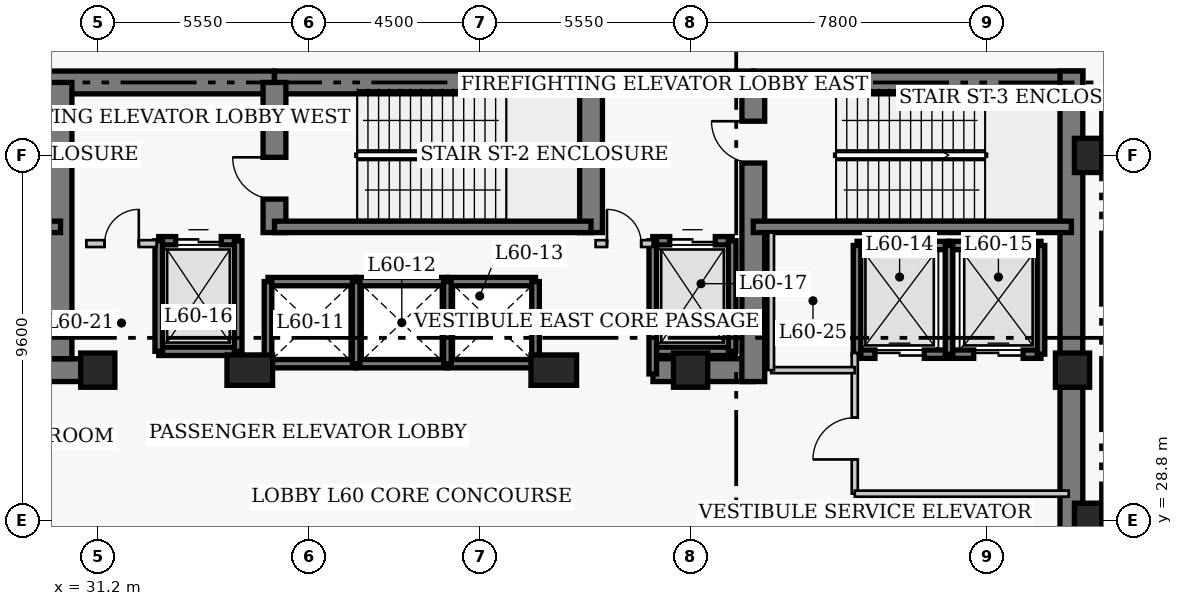
"""IFC4 building model, lengths in metres.
Left out: names, types, materials, properties, quantities, classifications, styles, units other than length and angle.
Written with IfcOpenShell. Run it as: python <this file> out.ifc"""

import sys

from ifc_helpers import new_model, si_unit, direction, frame, frame_2d, origin, origin_2d, place, context, subcontext, project, spatial, rectangle, extrude, element, fill, save


model = new_model("IFC4")
c1 = context("Model", 3, precision=1e-05, world=origin(), true_north=direction((0.0, 1.0)))
c2 = subcontext(c1, "Body", "Model", "MODEL_VIEW")
j1 = project(units=[si_unit("LENGTHUNIT", "METRE"), si_unit("PLANEANGLEUNIT", "RADIAN")], contexts=[c1])
p1 = place(None, origin())
s1 = spatial("IfcSite", under=j1, at=p1, CompositionType="ELEMENT")
p2 = place(p1, origin())
s2 = spatial("IfcBuilding", under=s1, at=p2, CompositionType="ELEMENT")
p3 = place(p2, frame((0.0, 0.0, 240.4)))
s3 = spatial("IfcBuildingStorey", under=s2, at=p3, CompositionType="ELEMENT", Elevation=240.4)
p4 = place(p3, frame((21.6, 40.32, 0.0), z_axis=(0.0, 0.0, 1.0), x_axis=(1.0, 0.0, 0.0)))
e1 = element("IfcWall", 1, at=p4, inside=s3, PredefinedType="SHEAR", context=c2, shape_type="SweptSolid", body=[
    extrude(rectangle(XDim=14.25, YDim=0.6, at=frame_2d((7.125, 0.0))), origin(), (0.0, 0.0, 1.0), 5.0),
])
p5 = place(p3, frame((35.85, 40.32, 0.0), z_axis=(0.0, 0.0, 1.0), x_axis=(1.0, 0.0, 0.0)))
e2 = element("IfcWall", 2, at=p5, inside=s3, PredefinedType="SHEAR", context=c2, shape_type="SweptSolid", body=[
    extrude(rectangle(XDim=12.6, YDim=0.6, at=frame_2d((6.3, 0.0))), origin(), (0.0, 0.0, 1.0), 5.0),
])
p6 = place(p3, frame((48.45, 40.32, 0.0), z_axis=(0.0, 0.0, 1.0), x_axis=(1.0, 0.0, 0.0)))
e3 = element("IfcWall", 3, at=p6, inside=s3, PredefinedType="SHEAR", context=c2, shape_type="SweptSolid", body=[
    extrude(rectangle(XDim=8.67, YDim=0.6, at=frame_2d((4.335, 0.0))), origin(), (0.0, 0.0, 1.0), 5.0),
])
p7 = place(p3, frame((56.82, 27.05, 0.0), z_axis=(0.0, 0.0, 1.0), x_axis=(0.0, 1.0, 0.0)))
e4 = element("IfcWall", 4, at=p7, inside=s3, PredefinedType="SHEAR", context=c2, shape_type="SweptSolid", body=[
    extrude(rectangle(XDim=13.57, YDim=0.6, at=frame_2d((6.785, 0.0))), origin(), (0.0, 0.0, 1.0), 5.0),
])
p8 = place(p3, frame((28.45, 32.75, 0.0), z_axis=(0.0, 0.0, 1.0), x_axis=(1.0, 0.0, 0.0)))
e5 = element("IfcWall", 5, at=p8, inside=s3, PredefinedType="SHEAR", context=c2, shape_type="SweptSolid", body=[
    extrude(rectangle(XDim=2.4, YDim=0.6, at=frame_2d((1.2, 0.0))), origin(), (0.0, 0.0, 1.0), 5.0),
])
p9 = place(p3, frame((45.81, 32.75, 0.0), z_axis=(0.0, 0.0, 1.0), x_axis=(1.0, 0.0, 0.0)))
e6 = element("IfcWall", 6, at=p9, inside=s3, PredefinedType="SHEAR", context=c2, shape_type="SweptSolid", body=[
    extrude(rectangle(XDim=2.64, YDim=0.6, at=frame_2d((1.32, 0.0))), origin(), (0.0, 0.0, 1.0), 5.0),
])
p10 = place(p3, frame((30.22, 33.05, 0.0), z_axis=(0.0, 0.0, 1.0), x_axis=(0.0, 1.0, 0.0)))
e7 = element("IfcWall", 7, at=p10, inside=s3, PredefinedType="SHEAR", context=c2, shape_type="SweptSolid", body=[
    extrude(rectangle(XDim=7.27, YDim=0.6, at=frame_2d((3.635, 0.0))), origin(), (0.0, 0.0, 1.0), 5.0),
])
p11 = place(p3, frame((35.85, 36.37, 0.0), z_axis=(0.0, 0.0, 1.0), x_axis=(0.0, 1.0, 0.0)))
e8 = element("IfcWall", 8, at=p11, inside=s3, PredefinedType="SHEAR", context=c2, shape_type="SweptSolid", body=[
    extrude(rectangle(XDim=3.95, YDim=0.6, at=frame_2d((1.975, 0.0))), origin(), (0.0, 0.0, 1.0), 5.0),
])
p12 = place(p11, frame((0.88, 0.0, 0.0)))
e9 = element("IfcOpeningElement", 9, at=p12, cuts=e8, PredefinedType="OPENING", context=c2, shape_type="SweptSolid", body=[
    extrude(rectangle(XDim=1.1, YDim=2.15, at=frame_2d((0.55, 1.075))), frame((0.0, 0.31, 0.0), z_axis=(0.0, -1.0, 0.0), x_axis=(1.0, 0.0, 0.0)), (0.0, 0.0, 1.0), 0.62),
])
p13 = place(p3, frame((44.18, 36.37, 0.0), z_axis=(0.0, 0.0, 1.0), x_axis=(0.0, 1.0, 0.0)))
e10 = element("IfcWall", 10, at=p13, inside=s3, PredefinedType="SHEAR", context=c2, shape_type="SweptSolid", body=[
    extrude(rectangle(XDim=3.95, YDim=0.6, at=frame_2d((1.975, 0.0))), origin(), (0.0, 0.0, 1.0), 5.0),
])
p14 = place(p3, frame((48.45, 32.45, 0.0), z_axis=(0.0, 0.0, 1.0), x_axis=(0.0, 1.0, 0.0)))
e11 = element("IfcWall", 11, at=p14, inside=s3, PredefinedType="SHEAR", context=c2, shape_type="SweptSolid", body=[
    extrude(rectangle(XDim=7.87, YDim=0.6, at=frame_2d((3.935, 0.0))), origin(), (0.0, 0.0, 1.0), 5.0),
])
p15 = place(p14, frame((5.75, 0.0, 0.0)))
e12 = element("IfcOpeningElement", 12, at=p15, cuts=e11, PredefinedType="OPENING", context=c2, shape_type="SweptSolid", body=[
    extrude(rectangle(XDim=1.1, YDim=2.15, at=frame_2d((0.55, 1.075))), frame((0.0, 0.31, 0.0), z_axis=(0.0, -1.0, 0.0), x_axis=(1.0, 0.0, 0.0)), (0.0, 0.0, 1.0), 0.62),
])
p16 = place(p3, frame((21.9, 36.52, 0.0), z_axis=(0.0, 0.0, 1.0), x_axis=(1.0, 0.0, 0.0)))
e13 = element("IfcWall", 13, at=p16, inside=s3, PredefinedType="SHEAR", context=c2, shape_type="SweptSolid", body=[
    extrude(rectangle(XDim=8.32, YDim=0.3, at=frame_2d((4.16, 0.0))), origin(), (0.0, 0.0, 1.0), 5.0),
])
p17 = place(p16, frame((0.9, 0.0, 0.0)))
e14 = element("IfcOpeningElement", 14, at=p17, cuts=e13, PredefinedType="OPENING", context=c2, shape_type="SweptSolid", body=[
    extrude(rectangle(XDim=1.1, YDim=2.15, at=frame_2d((0.55, 1.075))), frame((0.0, 0.16, 0.0), z_axis=(0.0, -1.0, 0.0), x_axis=(1.0, 0.0, 0.0)), (0.0, 0.0, 1.0), 0.32),
])
p18 = place(p3, frame((35.85, 36.52, 0.0), z_axis=(0.0, 0.0, 1.0), x_axis=(1.0, 0.0, 0.0)))
e15 = element("IfcWall", 15, at=p18, inside=s3, PredefinedType="SHEAR", context=c2, shape_type="SweptSolid", body=[
    extrude(rectangle(XDim=8.33, YDim=0.3, at=frame_2d((4.165, 0.0))), origin(), (0.0, 0.0, 1.0), 5.0),
])
p19 = place(p3, frame((48.45, 36.52, 0.0), z_axis=(0.0, 0.0, 1.0), x_axis=(1.0, 0.0, 0.0)))
e16 = element("IfcWall", 16, at=p19, inside=s3, PredefinedType="SHEAR", context=c2, shape_type="SweptSolid", body=[
    extrude(rectangle(XDim=8.37, YDim=0.3, at=frame_2d((4.185, 0.0))), origin(), (0.0, 0.0, 1.0), 5.0),
])
for number, where, z_axis, x_axis in (
    (17, (57.35, 28.8, 0.0), (0.0, 0.0, 1.0), (1.0, 0.0, 0.0)),
    (18, (57.35, 38.4, 0.0), (0.0, 0.0, 1.0), (1.0, 0.0, 0.0)),
    (19, (31.2, 32.75, 0.0), (0.0, 0.0, 1.0), (1.0, 0.0, 0.0)),
):
    element("IfcColumn", number, at=place(p3, frame(where, z_axis=z_axis, x_axis=x_axis)), inside=s3, PredefinedType="COLUMN", context=c2, shape_type="SweptSolid", body=[
        extrude(rectangle(XDim=0.9, YDim=0.9, at=origin_2d()), origin(), (0.0, 0.0, 1.0), 5.0),
    ])
for number, where, z_axis, x_axis in (
    (20, (35.2, 32.75, 0.0), (0.0, 0.0, 1.0), (1.0, 0.0, 0.0)),
    (21, (43.2, 32.75, 0.0), (0.0, 0.0, 1.0), (1.0, 0.0, 0.0)),
):
    element("IfcColumn", number, at=place(p3, frame(where, z_axis=z_axis, x_axis=x_axis)), inside=s3, PredefinedType="COLUMN", context=c2, shape_type="SweptSolid", body=[
        extrude(rectangle(XDim=1.2, YDim=0.8, at=origin_2d()), origin(), (0.0, 0.0, 1.0), 5.0),
    ])
for number, where, z_axis, x_axis in (
    (22, (46.8, 32.75, 0.0), (0.0, 0.0, 1.0), (1.0, 0.0, 0.0)),
    (23, (56.85, 32.75, 0.0), (0.0, 0.0, 1.0), (1.0, 0.0, 0.0)),
):
    element("IfcColumn", number, at=place(p3, frame(where, z_axis=z_axis, x_axis=x_axis)), inside=s3, PredefinedType="COLUMN", context=c2, shape_type="SweptSolid", body=[
        extrude(rectangle(XDim=0.9, YDim=0.9, at=origin_2d()), origin(), (0.0, 0.0, 1.0), 5.0),
    ])
for number, where, z_axis, x_axis in (
    (24, (35.68, 35.08, 0.0), (0.0, 0.0, 1.0), (1.0, 0.0, 0.0)),
    (25, (35.68, 32.92, 0.0), (0.0, 0.0, 1.0), (1.0, 0.0, 0.0)),
):
    element("IfcWall", number, at=place(p3, frame(where, z_axis=z_axis, x_axis=x_axis)), inside=s3, PredefinedType="SHEAR", context=c2, shape_type="SweptSolid", body=[
        extrude(rectangle(XDim=2.32, YDim=0.22, at=frame_2d((1.16, 0.0))), origin(), (0.0, 0.0, 1.0), 5.0),
    ])
p20 = place(p3, frame((35.68, 32.92, 0.0), z_axis=(0.0, 0.0, 1.0), x_axis=(0.0, 1.0, 0.0)))
e26 = element("IfcWall", 26, at=p20, inside=s3, PredefinedType="SHEAR", context=c2, shape_type="SweptSolid", body=[
    extrude(rectangle(XDim=2.16, YDim=0.2, at=frame_2d((1.08, 0.0))), origin(), (0.0, 0.0, 1.0), 5.0),
])
for number, where, z_axis, x_axis in (
    (27, (38.0, 35.08, 0.0), (0.0, 0.0, 1.0), (1.0, 0.0, 0.0)),
    (28, (38.0, 32.92, 0.0), (0.0, 0.0, 1.0), (1.0, 0.0, 0.0)),
):
    element("IfcWall", number, at=place(p3, frame(where, z_axis=z_axis, x_axis=x_axis)), inside=s3, PredefinedType="SHEAR", context=c2, shape_type="SweptSolid", body=[
        extrude(rectangle(XDim=2.4, YDim=0.22, at=frame_2d((1.2, 0.0))), origin(), (0.0, 0.0, 1.0), 5.0),
    ])
p21 = place(p3, frame((38.0, 32.92, 0.0), z_axis=(0.0, 0.0, 1.0), x_axis=(0.0, 1.0, 0.0)))
e29 = element("IfcWall", 29, at=p21, inside=s3, PredefinedType="SHEAR", context=c2, shape_type="SweptSolid", body=[
    extrude(rectangle(XDim=2.16, YDim=0.2, at=frame_2d((1.08, 0.0))), origin(), (0.0, 0.0, 1.0), 5.0),
])
for number, where, z_axis, x_axis in (
    (30, (40.4, 35.08, 0.0), (0.0, 0.0, 1.0), (1.0, 0.0, 0.0)),
    (31, (40.4, 32.92, 0.0), (0.0, 0.0, 1.0), (1.0, 0.0, 0.0)),
):
    element("IfcWall", number, at=place(p3, frame(where, z_axis=z_axis, x_axis=x_axis)), inside=s3, PredefinedType="SHEAR", context=c2, shape_type="SweptSolid", body=[
        extrude(rectangle(XDim=2.32, YDim=0.22, at=frame_2d((1.16, 0.0))), origin(), (0.0, 0.0, 1.0), 5.0),
    ])
for number, where, z_axis, x_axis in (
    (32, (40.4, 32.92, 0.0), (0.0, 0.0, 1.0), (0.0, 1.0, 0.0)),
    (33, (42.72, 32.92, 0.0), (0.0, 0.0, 1.0), (0.0, 1.0, 0.0)),
):
    element("IfcWall", number, at=place(p3, frame(where, z_axis=z_axis, x_axis=x_axis)), inside=s3, PredefinedType="SHEAR", context=c2, shape_type="SweptSolid", body=[
        extrude(rectangle(XDim=2.16, YDim=0.2, at=frame_2d((1.08, 0.0))), origin(), (0.0, 0.0, 1.0), 5.0),
    ])
p22 = place(p3, frame((51.18, 36.03, 0.0), z_axis=(0.0, 0.0, 1.0), x_axis=(1.0, 0.0, 0.0)))
e34 = element("IfcWall", 34, at=p22, inside=s3, PredefinedType="SHEAR", context=c2, shape_type="SweptSolid", body=[
    extrude(rectangle(XDim=2.42, YDim=0.22, at=frame_2d((1.21, 0.0))), origin(), (0.0, 0.0, 1.0), 5.0),
])
p23 = place(p3, frame((51.18, 33.17, 0.0), z_axis=(0.0, 0.0, 1.0), x_axis=(1.0, 0.0, 0.0)))
e35 = element("IfcWall", 35, at=p23, inside=s3, PredefinedType="SHEAR", context=c2, shape_type="SweptSolid", body=[
    extrude(rectangle(XDim=2.42, YDim=0.22, at=frame_2d((1.21, 0.0))), origin(), (0.0, 0.0, 1.0), 5.0),
])
p24 = place(p23, frame((0.47, 0.0, 0.0)))
e36 = element("IfcOpeningElement", 36, at=p24, cuts=e35, PredefinedType="OPENING", context=c2, shape_type="SweptSolid", body=[
    extrude(rectangle(XDim=1.3, YDim=2.15, at=frame_2d((0.65, 1.075))), frame((0.0, 0.12, 0.0), z_axis=(0.0, -1.0, 0.0), x_axis=(1.0, 0.0, 0.0)), (0.0, 0.0, 1.0), 0.24),
])
p25 = place(p3, frame((51.18, 33.17, 0.0), z_axis=(0.0, 0.0, 1.0), x_axis=(0.0, 1.0, 0.0)))
e37 = element("IfcWall", 37, at=p25, inside=s3, PredefinedType="SHEAR", context=c2, shape_type="SweptSolid", body=[
    extrude(rectangle(XDim=2.86, YDim=0.2, at=frame_2d((1.43, 0.0))), origin(), (0.0, 0.0, 1.0), 5.0),
])
p26 = place(p3, frame((53.6, 36.03, 0.0), z_axis=(0.0, 0.0, 1.0), x_axis=(1.0, 0.0, 0.0)))
e38 = element("IfcWall", 38, at=p26, inside=s3, PredefinedType="SHEAR", context=c2, shape_type="SweptSolid", body=[
    extrude(rectangle(XDim=2.42, YDim=0.22, at=frame_2d((1.21, 0.0))), origin(), (0.0, 0.0, 1.0), 5.0),
])
p27 = place(p3, frame((53.6, 33.17, 0.0), z_axis=(0.0, 0.0, 1.0), x_axis=(1.0, 0.0, 0.0)))
e39 = element("IfcWall", 39, at=p27, inside=s3, PredefinedType="SHEAR", context=c2, shape_type="SweptSolid", body=[
    extrude(rectangle(XDim=2.42, YDim=0.22, at=frame_2d((1.21, 0.0))), origin(), (0.0, 0.0, 1.0), 5.0),
])
p28 = place(p27, frame((0.65, 0.0, 0.0)))
e40 = element("IfcOpeningElement", 40, at=p28, cuts=e39, PredefinedType="OPENING", context=c2, shape_type="SweptSolid", body=[
    extrude(rectangle(XDim=1.3, YDim=2.15, at=frame_2d((0.65, 1.075))), frame((0.0, 0.12, 0.0), z_axis=(0.0, -1.0, 0.0), x_axis=(1.0, 0.0, 0.0)), (0.0, 0.0, 1.0), 0.24),
])
for number, where, z_axis, x_axis in (
    (41, (53.6, 33.17, 0.0), (0.0, 0.0, 1.0), (0.0, 1.0, 0.0)),
    (42, (56.02, 33.17, 0.0), (0.0, 0.0, 1.0), (0.0, 1.0, 0.0)),
):
    element("IfcWall", number, at=place(p3, frame(where, z_axis=z_axis, x_axis=x_axis)), inside=s3, PredefinedType="SHEAR", context=c2, shape_type="SweptSolid", body=[
        extrude(rectangle(XDim=2.86, YDim=0.2, at=frame_2d((1.43, 0.0))), origin(), (0.0, 0.0, 1.0), 5.0),
    ])
p29 = place(p3, frame((32.805, 36.155, 0.0), z_axis=(0.0, 0.0, 1.0), x_axis=(1.0, 0.0, 0.0)))
e43 = element("IfcWall", 43, at=p29, inside=s3, PredefinedType="SHEAR", context=c2, shape_type="SweptSolid", body=[
    extrude(rectangle(XDim=2.09, YDim=0.22, at=frame_2d((1.045, 0.0))), origin(), (0.0, 0.0, 1.0), 5.0),
])
p30 = place(p29, frame((0.445, 0.0, 0.0)))
e44 = element("IfcOpeningElement", 44, at=p30, cuts=e43, PredefinedType="OPENING", context=c2, shape_type="SweptSolid", body=[
    extrude(rectangle(XDim=1.2, YDim=2.15, at=frame_2d((0.6, 1.075))), frame((0.0, 0.12, 0.0), z_axis=(0.0, -1.0, 0.0), x_axis=(1.0, 0.0, 0.0)), (0.0, 0.0, 1.0), 0.24),
])
p31 = place(p3, frame((32.805, 33.245, 0.0), z_axis=(0.0, 0.0, 1.0), x_axis=(1.0, 0.0, 0.0)))
e45 = element("IfcWall", 45, at=p31, inside=s3, PredefinedType="SHEAR", context=c2, shape_type="SweptSolid", body=[
    extrude(rectangle(XDim=2.09, YDim=0.22, at=frame_2d((1.045, 0.0))), origin(), (0.0, 0.0, 1.0), 5.0),
])
for number, where, z_axis, x_axis in (
    (46, (32.805, 33.245, 0.0), (0.0, 0.0, 1.0), (0.0, 1.0, 0.0)),
    (47, (34.895, 33.245, 0.0), (0.0, 0.0, 1.0), (0.0, 1.0, 0.0)),
):
    element("IfcWall", number, at=place(p3, frame(where, z_axis=z_axis, x_axis=x_axis)), inside=s3, PredefinedType="SHEAR", context=c2, shape_type="SweptSolid", body=[
        extrude(rectangle(XDim=2.91, YDim=0.2, at=frame_2d((1.455, 0.0))), origin(), (0.0, 0.0, 1.0), 5.0),
    ])
p32 = place(p3, frame((45.805, 36.155, 0.0), z_axis=(0.0, 0.0, 1.0), x_axis=(1.0, 0.0, 0.0)))
e48 = element("IfcWall", 48, at=p32, inside=s3, PredefinedType="SHEAR", context=c2, shape_type="SweptSolid", body=[
    extrude(rectangle(XDim=2.09, YDim=0.22, at=frame_2d((1.045, 0.0))), origin(), (0.0, 0.0, 1.0), 5.0),
])
p33 = place(p32, frame((0.445, 0.0, 0.0)))
e49 = element("IfcOpeningElement", 49, at=p33, cuts=e48, PredefinedType="OPENING", context=c2, shape_type="SweptSolid", body=[
    extrude(rectangle(XDim=1.2, YDim=2.15, at=frame_2d((0.6, 1.075))), frame((0.0, 0.12, 0.0), z_axis=(0.0, -1.0, 0.0), x_axis=(1.0, 0.0, 0.0)), (0.0, 0.0, 1.0), 0.24),
])
p34 = place(p3, frame((45.805, 33.245, 0.0), z_axis=(0.0, 0.0, 1.0), x_axis=(1.0, 0.0, 0.0)))
e50 = element("IfcWall", 50, at=p34, inside=s3, PredefinedType="SHEAR", context=c2, shape_type="SweptSolid", body=[
    extrude(rectangle(XDim=2.09, YDim=0.22, at=frame_2d((1.045, 0.0))), origin(), (0.0, 0.0, 1.0), 5.0),
])
p35 = place(p3, frame((45.805, 32.65, 0.0), z_axis=(0.0, 0.0, 1.0), x_axis=(0.0, 1.0, 0.0)))
e51 = element("IfcWall", 51, at=p35, inside=s3, PredefinedType="SHEAR", context=c2, shape_type="SweptSolid", body=[
    extrude(rectangle(XDim=3.505, YDim=0.2, at=frame_2d((1.752, 0.0))), origin(), (0.0, 0.0, 1.0), 5.0),
])
p36 = place(p3, frame((47.895, 33.245, 0.0), z_axis=(0.0, 0.0, 1.0), x_axis=(0.0, 1.0, 0.0)))
e52 = element("IfcWall", 52, at=p36, inside=s3, PredefinedType="SHEAR", context=c2, shape_type="SweptSolid", body=[
    extrude(rectangle(XDim=2.91, YDim=0.2, at=frame_2d((1.455, 0.0))), origin(), (0.0, 0.0, 1.0), 5.0),
])
p37 = place(p3, frame((30.9, 36.08, 0.0), z_axis=(0.0, 0.0, 1.0), x_axis=(1.0, 0.0, 0.0)))
e53 = element("IfcWall", 53, at=p37, inside=s3, PredefinedType="PARTITIONING", context=c2, shape_type="SweptSolid", body=[
    extrude(rectangle(XDim=1.85, YDim=0.18, at=frame_2d((0.925, 0.0))), origin(), (0.0, 0.0, 1.0), 4.76),
])
p38 = place(p37, frame((0.48, 0.0, 0.0)))
e54 = element("IfcOpeningElement", 54, at=p38, cuts=e53, PredefinedType="OPENING", context=c2, shape_type="SweptSolid", body=[
    extrude(rectangle(XDim=0.9, YDim=2.15, at=frame_2d((0.45, 1.075))), frame((0.0, 0.1, 0.0), z_axis=(0.0, -1.0, 0.0), x_axis=(1.0, 0.0, 0.0)), (0.0, 0.0, 1.0), 0.2),
])
p39 = place(p3, frame((44.3, 36.08, 0.0), z_axis=(0.0, 0.0, 1.0), x_axis=(1.0, 0.0, 0.0)))
e55 = element("IfcWall", 55, at=p39, inside=s3, PredefinedType="PARTITIONING", context=c2, shape_type="SweptSolid", body=[
    extrude(rectangle(XDim=1.5, YDim=0.18, at=frame_2d((0.75, 0.0))), origin(), (0.0, 0.0, 1.0), 4.76),
])
p40 = place(p39, frame((0.3, 0.0, 0.0)))
e56 = element("IfcOpeningElement", 56, at=p40, cuts=e55, PredefinedType="OPENING", context=c2, shape_type="SweptSolid", body=[
    extrude(rectangle(XDim=0.9, YDim=2.15, at=frame_2d((0.45, 1.075))), frame((0.0, 0.1, 0.0), z_axis=(0.0, -1.0, 0.0), x_axis=(1.0, 0.0, 0.0)), (0.0, 0.0, 1.0), 0.2),
])
p41 = place(p3, frame((51.12, 29.5, 0.0), z_axis=(0.0, 0.0, 1.0), x_axis=(0.0, 1.0, 0.0)))
e57 = element("IfcWall", 57, at=p41, inside=s3, PredefinedType="PARTITIONING", context=c2, shape_type="SweptSolid", body=[
    extrude(rectangle(XDim=3.7, YDim=0.16, at=frame_2d((1.85, 0.0))), origin(), (0.0, 0.0, 1.0), 4.76),
])
p42 = place(p41, frame((0.9, 0.0, 0.0)))
e58 = element("IfcOpeningElement", 58, at=p42, cuts=e57, PredefinedType="OPENING", context=c2, shape_type="SweptSolid", body=[
    extrude(rectangle(XDim=1.1, YDim=2.15, at=frame_2d((0.55, 1.075))), frame((0.0, 0.09, 0.0), z_axis=(0.0, -1.0, 0.0), x_axis=(1.0, 0.0, 0.0)), (0.0, 0.0, 1.0), 0.18),
])
p43 = place(p3, frame((51.12, 29.5, 0.0), z_axis=(0.0, 0.0, 1.0), x_axis=(1.0, 0.0, 0.0)))
e59 = element("IfcWall", 59, at=p43, inside=s3, PredefinedType="PARTITIONING", context=c2, shape_type="SweptSolid", body=[
    extrude(rectangle(XDim=5.63, YDim=0.16, at=frame_2d((2.815, 0.0))), origin(), (0.0, 0.0, 1.0), 4.76),
])
p44 = place(p3, frame((48.92, 32.75, 0.0), z_axis=(0.0, 0.0, 1.0), x_axis=(1.0, 0.0, 0.0)))
e60 = element("IfcWall", 60, at=p44, inside=s3, PredefinedType="PARTITIONING", context=c2, shape_type="SweptSolid", body=[
    extrude(rectangle(XDim=2.2, YDim=0.16, at=frame_2d((1.1, 0.0))), origin(), (0.0, 0.0, 1.0), 4.76),
])
p45 = place(p3, frame((48.92, 32.75, 0.0), z_axis=(0.0, 0.0, 1.0), x_axis=(0.0, 1.0, 0.0)))
e61 = element("IfcWall", 61, at=p45, inside=s3, PredefinedType="PARTITIONING", context=c2, shape_type="SweptSolid", body=[
    extrude(rectangle(XDim=3.62, YDim=0.15, at=frame_2d((1.81, 0.0))), origin(), (0.0, 0.0, 1.0), 4.76),
])
p46 = place(p24, origin())
e62 = element("IfcDoor", 62, at=p46, inside=s3, OperationType="DOUBLE_DOOR_SLIDING", PredefinedType="DOOR", context=c2, shape_type="SweptSolid", body=[
    extrude(rectangle(XDim=1.3, YDim=2.15, at=frame_2d((0.65, 1.075))), frame((0.0, 0.025, 0.0), z_axis=(0.0, -1.0, 0.0), x_axis=(1.0, 0.0, 0.0)), (0.0, 0.0, 1.0), 0.05),
])
fill(e36, e62)
p47 = place(p28, origin())
e63 = element("IfcDoor", 63, at=p47, inside=s3, OperationType="DOUBLE_DOOR_SLIDING", PredefinedType="DOOR", context=c2, shape_type="SweptSolid", body=[
    extrude(rectangle(XDim=1.3, YDim=2.15, at=frame_2d((0.65, 1.075))), frame((0.0, 0.025, 0.0), z_axis=(0.0, -1.0, 0.0), x_axis=(1.0, 0.0, 0.0)), (0.0, 0.0, 1.0), 0.05),
])
fill(e40, e63)
p48 = place(p30, origin())
e64 = element("IfcDoor", 64, at=p48, inside=s3, OperationType="DOUBLE_DOOR_SLIDING", PredefinedType="DOOR", context=c2, shape_type="SweptSolid", body=[
    extrude(rectangle(XDim=1.2, YDim=2.15, at=frame_2d((0.6, 1.075))), frame((0.0, 0.025, 0.0), z_axis=(0.0, -1.0, 0.0), x_axis=(1.0, 0.0, 0.0)), (0.0, 0.0, 1.0), 0.05),
])
fill(e44, e64)
p49 = place(p33, origin())
e65 = element("IfcDoor", 65, at=p49, inside=s3, OperationType="DOUBLE_DOOR_SLIDING", PredefinedType="DOOR", context=c2, shape_type="SweptSolid", body=[
    extrude(rectangle(XDim=1.2, YDim=2.15, at=frame_2d((0.6, 1.075))), frame((0.0, 0.025, 0.0), z_axis=(0.0, -1.0, 0.0), x_axis=(1.0, 0.0, 0.0)), (0.0, 0.0, 1.0), 0.05),
])
fill(e49, e65)
p50 = place(p38, origin())
e66 = element("IfcDoor", 66, at=p50, inside=s3, OperationType="SINGLE_SWING_RIGHT", PredefinedType="DOOR", context=c2, shape_type="SweptSolid", body=[
    extrude(rectangle(XDim=0.9, YDim=2.15, at=frame_2d((0.45, 1.075))), frame((0.0, 0.025, 0.0), z_axis=(0.0, -1.0, 0.0), x_axis=(1.0, 0.0, 0.0)), (0.0, 0.0, 1.0), 0.05),
])
fill(e54, e66)
p51 = place(p40, origin())
e67 = element("IfcDoor", 67, at=p51, inside=s3, OperationType="SINGLE_SWING_LEFT", PredefinedType="DOOR", context=c2, shape_type="SweptSolid", body=[
    extrude(rectangle(XDim=0.9, YDim=2.15, at=frame_2d((0.45, 1.075))), frame((0.0, 0.025, 0.0), z_axis=(0.0, -1.0, 0.0), x_axis=(1.0, 0.0, 0.0)), (0.0, 0.0, 1.0), 0.05),
])
fill(e56, e67)
p52 = place(p42, origin())
e68 = element("IfcDoor", 68, at=p52, inside=s3, OperationType="SINGLE_SWING_LEFT", PredefinedType="DOOR", context=c2, shape_type="SweptSolid", body=[
    extrude(rectangle(XDim=1.1, YDim=2.15, at=frame_2d((0.55, 1.075))), frame((0.0, 0.025, 0.0), z_axis=(0.0, -1.0, 0.0), x_axis=(1.0, 0.0, 0.0)), (0.0, 0.0, 1.0), 0.05),
])
fill(e58, e68)
p53 = place(p12, origin())
e69 = element("IfcDoor", 69, at=p53, inside=s3, OperationType="SINGLE_SWING_RIGHT", PredefinedType="DOOR", context=c2, shape_type="SweptSolid", body=[
    extrude(rectangle(XDim=1.1, YDim=2.15, at=frame_2d((0.55, 1.075))), frame((0.0, 0.025, 0.0), z_axis=(0.0, -1.0, 0.0), x_axis=(1.0, 0.0, 0.0)), (0.0, 0.0, 1.0), 0.05),
])
fill(e9, e69)
p54 = place(p15, origin())
e70 = element("IfcDoor", 70, at=p54, inside=s3, OperationType="SINGLE_SWING_RIGHT", PredefinedType="DOOR", context=c2, shape_type="SweptSolid", body=[
    extrude(rectangle(XDim=1.1, YDim=2.15, at=frame_2d((0.55, 1.075))), frame((0.0, 0.025, 0.0), z_axis=(0.0, -1.0, 0.0), x_axis=(1.0, 0.0, 0.0)), (0.0, 0.0, 1.0), 0.05),
])
fill(e12, e70)
save(model, sys.argv[1])
